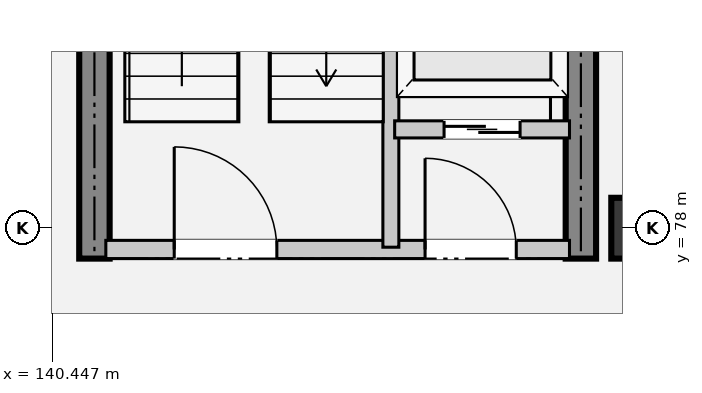
"""IFC4 building model, lengths in metres.
Left out: names, types, materials, properties, quantities, classifications, styles, units other than length and angle.
Written with IfcOpenShell. Run it as: python <this file> out.ifc"""

import sys

from ifc_helpers import new_model, si_unit, direction, frame, frame_2d, origin, origin_2d, place, context, subcontext, project, spatial, rectangle, extrude, element, fill, save


model = new_model("IFC4")
c1 = context("Model", 3, precision=1e-05, world=origin(), true_north=direction((0.0, 1.0)))
c2 = subcontext(c1, "Body", "Model", "MODEL_VIEW")
j1 = project(units=[si_unit("LENGTHUNIT", "METRE"), si_unit("PLANEANGLEUNIT", "RADIAN")], contexts=[c1])
p1 = place(None, origin())
s1 = spatial("IfcSite", under=j1, at=p1, CompositionType="ELEMENT")
p2 = place(p1, origin())
s2 = spatial("IfcBuilding", under=s1, at=p2, CompositionType="ELEMENT")
p3 = place(p2, frame((0.0, 0.0, -4.8)))
s3 = spatial("IfcBuildingStorey", under=s2, at=p3, CompositionType="ELEMENT", Elevation=-4.8)
p4 = place(p3, frame((148.2, 78.0, 0.0), z_axis=(0.0, 0.0, 1.0), x_axis=(1.0, 0.0, 0.0)))
e1 = element("IfcColumn", 1, at=p4, inside=s3, PredefinedType="COLUMN", context=c2, shape_type="SweptSolid", body=[
    extrude(rectangle(XDim=0.8, YDim=0.8, at=origin_2d()), origin(), (0.0, 0.0, 1.0), 4.8),
])
for number, where, z_axis, x_axis in (
    (2, (141.0, 77.6, 0.0), (0.0, 0.0, 1.0), (0.0, 1.0, 0.0)),
    (3, (147.4, 77.6, 0.0), (0.0, 0.0, 1.0), (0.0, 1.0, 0.0)),
):
    element("IfcWall", number, at=place(p3, frame(where, z_axis=z_axis, x_axis=x_axis)), inside=s3, PredefinedType="SHEAR", context=c2, shape_type="SweptSolid", body=[
        extrude(rectangle(XDim=8.6, YDim=0.4, at=frame_2d((4.3, 0.0))), origin(), (0.0, 0.0, 1.0), 4.8),
    ])
p5 = place(p3, frame((141.15, 77.72, 0.0), z_axis=(0.0, 0.0, 1.0), x_axis=(1.0, 0.0, 0.0)))
e4 = element("IfcWall", 4, at=p5, inside=s3, PredefinedType="PARTITIONING", context=c2, shape_type="SweptSolid", body=[
    extrude(rectangle(XDim=6.1, YDim=0.24, at=frame_2d((3.05, 0.0))), origin(), (0.0, 0.0, 1.0), 3.84),
])
p6 = place(p5, frame((0.9, 0.0, 0.0)))
e5 = element("IfcOpeningElement", 5, at=p6, cuts=e4, PredefinedType="OPENING", context=c2, shape_type="SweptSolid", body=[
    extrude(rectangle(XDim=1.35, YDim=2.2, at=frame_2d((0.675, 1.1))), frame((0.0, 0.13, 0.0), z_axis=(0.0, -1.0, 0.0), x_axis=(1.0, 0.0, 0.0)), (0.0, 0.0, 1.0), 0.26),
])
p7 = place(p5, frame((4.2, 0.0, 0.0)))
e6 = element("IfcOpeningElement", 6, at=p7, cuts=e4, PredefinedType="OPENING", context=c2, shape_type="SweptSolid", body=[
    extrude(rectangle(XDim=1.2, YDim=2.2, at=frame_2d((0.6, 1.1))), frame((0.0, 0.13, 0.0), z_axis=(0.0, -1.0, 0.0), x_axis=(1.0, 0.0, 0.0)), (0.0, 0.0, 1.0), 0.26),
])
p8 = place(p3, frame((144.9, 77.75, 0.0), z_axis=(0.0, 0.0, 1.0), x_axis=(0.0, 1.0, 0.0)))
e7 = element("IfcWall", 7, at=p8, inside=s3, PredefinedType="PARTITIONING", context=c2, shape_type="SweptSolid", body=[
    extrude(rectangle(XDim=8.3, YDim=0.21, at=frame_2d((4.15, 0.0))), origin(), (0.0, 0.0, 1.0), 3.84),
])
p9 = place(p3, frame((144.95, 79.3, 0.0), z_axis=(0.0, 0.0, 1.0), x_axis=(1.0, 0.0, 0.0)))
e8 = element("IfcWall", 8, at=p9, inside=s3, PredefinedType="PARTITIONING", context=c2, shape_type="SweptSolid", body=[
    extrude(rectangle(XDim=2.3, YDim=0.225, at=frame_2d((1.15, 0.0))), origin(), (0.0, 0.0, 1.0), 3.84),
])
p10 = place(p9, frame((0.65, 0.0, 0.0)))
e9 = element("IfcOpeningElement", 9, at=p10, cuts=e8, PredefinedType="OPENING", context=c2, shape_type="SweptSolid", body=[
    extrude(rectangle(XDim=1.0, YDim=2.15, at=frame_2d((0.5, 1.075))), frame((0.0, 0.123, 0.0), z_axis=(0.0, -1.0, 0.0), x_axis=(1.0, 0.0, 0.0)), (0.0, 0.0, 1.0), 0.245),
])
p11 = place(p6, origin())
e10 = element("IfcDoor", 10, at=p11, inside=s3, OperationType="SINGLE_SWING_LEFT", PredefinedType="DOOR", context=c2, shape_type="SweptSolid", body=[
    extrude(rectangle(XDim=1.35, YDim=2.2, at=frame_2d((0.675, 1.1))), frame((0.0, 0.025, 0.0), z_axis=(0.0, -1.0, 0.0), x_axis=(1.0, 0.0, 0.0)), (0.0, 0.0, 1.0), 0.05),
])
fill(e5, e10)
p12 = place(p7, origin())
e11 = element("IfcDoor", 11, at=p12, inside=s3, OperationType="SINGLE_SWING_RIGHT", PredefinedType="DOOR", context=c2, shape_type="SweptSolid", body=[
    extrude(rectangle(XDim=1.2, YDim=2.2, at=frame_2d((0.6, 1.1))), frame((0.0, 0.025, 0.0), z_axis=(0.0, -1.0, 0.0), x_axis=(1.0, 0.0, 0.0)), (0.0, 0.0, 1.0), 0.05),
])
fill(e6, e11)
p13 = place(p10, origin())
e12 = element("IfcDoor", 12, at=p13, inside=s3, OperationType="SLIDING_TO_LEFT", PredefinedType="DOOR", context=c2, shape_type="SweptSolid", body=[
    extrude(rectangle(XDim=1.0, YDim=2.15, at=frame_2d((0.5, 1.075))), frame((0.0, 0.025, 0.0), z_axis=(0.0, -1.0, 0.0), x_axis=(1.0, 0.0, 0.0)), (0.0, 0.0, 1.0), 0.05),
])
fill(e9, e12)
save(model, sys.argv[1])
